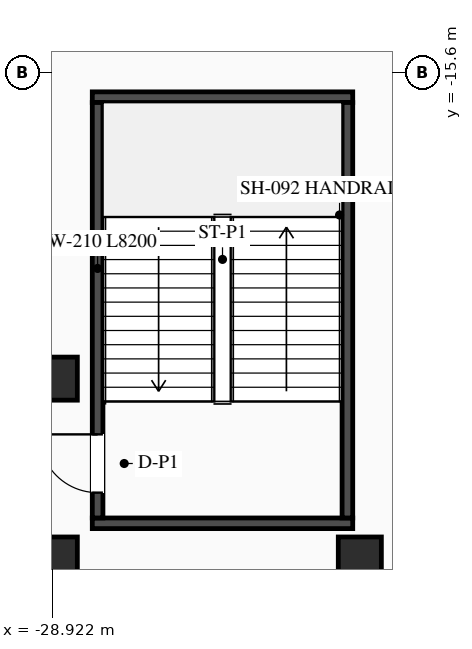
"""IFC4 building model, lengths in metres.
Left out: names, types, materials, properties, quantities, classifications, styles, units other than length and angle.
Written with IfcOpenShell. Run it as: python <this file> out.ifc"""

import sys

from ifc_helpers import new_model, si_unit, direction, frame, frame_2d, origin, origin_2d, place, context, subcontext, project, spatial, rectangle, i_section, extrude, element, fill, save


model = new_model("IFC4")
c1 = context("Model", 3, precision=1e-05, world=origin(), true_north=direction((0.0, 1.0)))
c2 = subcontext(c1, "Body", "Model", "MODEL_VIEW")
j1 = project(units=[si_unit("LENGTHUNIT", "METRE"), si_unit("PLANEANGLEUNIT", "RADIAN")], contexts=[c1])
p1 = place(None, origin())
s1 = spatial("IfcSite", under=j1, at=p1, CompositionType="ELEMENT")
p2 = place(p1, origin())
s2 = spatial("IfcBuilding", under=s1, at=p2, CompositionType="ELEMENT")
p3 = place(p2, origin())
s3 = spatial("IfcBuildingStorey", under=s2, at=p3, CompositionType="ELEMENT", Elevation=0.0)
for number, where, z_axis, x_axis in (
    (1, (-28.13, -24.505, 0.0), (0.0, 0.0, 1.0), (1.0, 0.0, 0.0)),
    (2, (-28.13, -16.095, 0.0), (0.0, 0.0, 1.0), (1.0, 0.0, 0.0)),
):
    element("IfcWall", number, at=place(p3, frame(where, z_axis=z_axis, x_axis=x_axis)), inside=s3, PredefinedType="SHEAR", context=c2, shape_type="SweptSolid", body=[
        extrude(rectangle(XDim=5.14, YDim=0.21, at=frame_2d((2.57, 0.0))), origin(), (0.0, 0.0, 1.0), 4.85),
    ])
p4 = place(p3, frame((-28.025, -24.4, 0.0), z_axis=(0.0, 0.0, 1.0), x_axis=(0.0, 1.0, 0.0)))
e3 = element("IfcWall", 3, at=p4, inside=s3, PredefinedType="SHEAR", context=c2, shape_type="SweptSolid", body=[
    extrude(rectangle(XDim=8.2, YDim=0.21, at=frame_2d((4.1, 0.0))), origin(), (0.0, 0.0, 1.0), 4.85),
])
p5 = place(p4, frame((0.5, 0.0, 0.0)))
e4 = element("IfcOpeningElement", 4, at=p5, cuts=e3, PredefinedType="OPENING", context=c2, shape_type="SweptSolid", body=[
    extrude(rectangle(XDim=1.15, YDim=2.1, at=frame_2d((0.575, 1.05))), frame((0.0, 0.115, 0.0), z_axis=(0.0, -1.0, 0.0), x_axis=(1.0, 0.0, 0.0)), (0.0, 0.0, 1.0), 0.23),
])
p6 = place(p3, frame((-23.095, -24.4, 0.0), z_axis=(0.0, 0.0, 1.0), x_axis=(0.0, 1.0, 0.0)))
e5 = element("IfcWall", 5, at=p6, inside=s3, PredefinedType="SHEAR", context=c2, shape_type="SweptSolid", body=[
    extrude(rectangle(XDim=8.2, YDim=0.21, at=frame_2d((4.1, 0.0))), origin(), (0.0, 0.0, 1.0), 4.85),
])
for number, where, z_axis, x_axis in (
    (6, (-28.85, -21.65, 0.0), (0.0, 0.0, 1.0), (1.0, 0.0, 0.0)),
    (7, (-28.85, -25.2, 0.0), (0.0, 0.0, 1.0), (1.0, 0.0, 0.0)),
    (8, (-22.85, -25.2, 0.0), (0.0, 0.0, 1.0), (1.0, 0.0, 0.0)),
):
    element("IfcColumn", number, at=place(p3, frame(where, z_axis=z_axis, x_axis=x_axis)), inside=s3, PredefinedType="COLUMN", context=c2, shape_type="SweptSolid", body=[
        extrude(i_section(OverallWidth=0.85, OverallDepth=0.85, WebThickness=0.032, FlangeThickness=0.048, at=origin_2d()), origin(), (0.0, 0.0, 1.0), 5.1),
    ])
p7 = place(p5, origin())
e9 = element("IfcDoor", 9, at=p7, inside=s3, OperationType="SINGLE_SWING_RIGHT", PredefinedType="DOOR", context=c2, shape_type="SweptSolid", body=[
    extrude(rectangle(XDim=1.15, YDim=2.1, at=frame_2d((0.575, 1.05))), frame((0.0, 0.025, 0.0), z_axis=(0.0, -1.0, 0.0), x_axis=(1.0, 0.0, 0.0)), (0.0, 0.0, 1.0), 0.05),
])
fill(e4, e9)
save(model, sys.argv[1])
